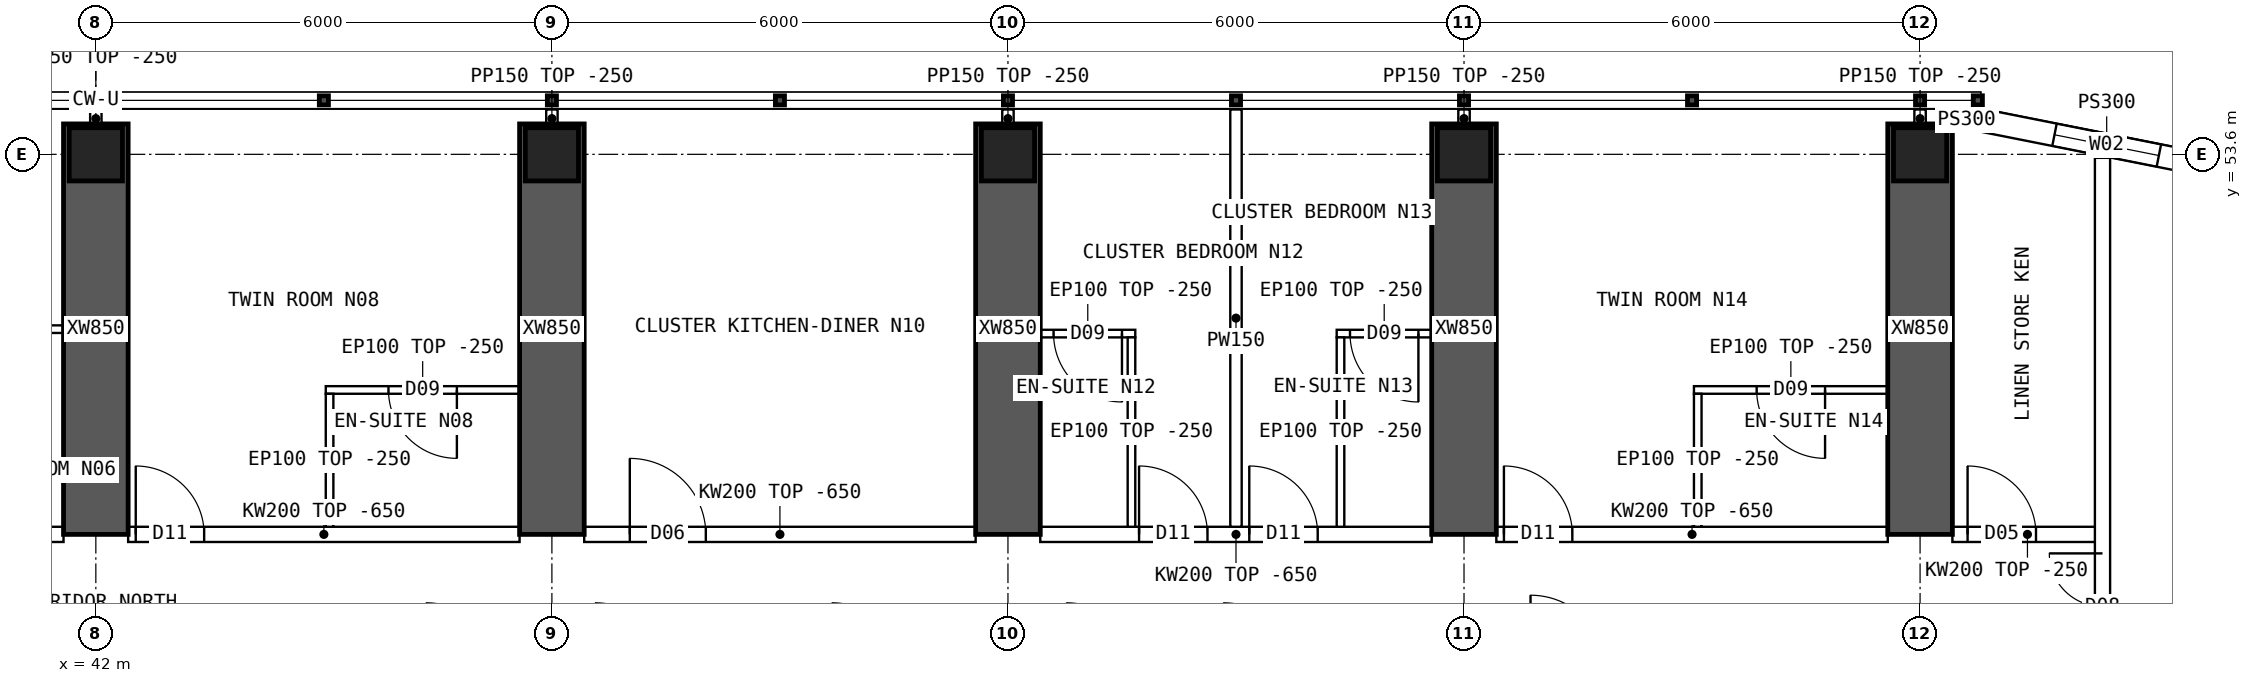
"""IFC4 building model, lengths in metres.
Left out: names, types, materials, properties, quantities, classifications, styles, units other than length and angle.
Written with IfcOpenShell. Run it as: python <this file> out.ifc"""

import sys

from ifc_helpers import new_model, si_unit, direction, frame, frame_2d, origin, origin_2d, place, context, subcontext, project, spatial, polyline, rectangle, hollow_rectangle, outline, extrude, element, fill, save


model = new_model("IFC4")
c1 = context("Model", 3, precision=1e-05, world=origin(), true_north=direction((0.0, 1.0)))
c2 = subcontext(c1, "Body", "Model", "MODEL_VIEW")
j1 = project(units=[si_unit("LENGTHUNIT", "METRE"), si_unit("PLANEANGLEUNIT", "RADIAN")], contexts=[c1])
p1 = place(None, origin())
s1 = spatial("IfcSite", under=j1, at=p1, CompositionType="ELEMENT")
p2 = place(p1, origin())
s2 = spatial("IfcBuilding", under=s1, at=p2, CompositionType="ELEMENT")
p3 = place(p2, frame((0.0, 0.0, 193.6)))
s3 = spatial("IfcBuildingStorey", under=s2, at=p3, CompositionType="ELEMENT", Elevation=193.6)
for number, where, z_axis, x_axis in (
    (1, (42.0, 53.6, 0.0), (0.0, 0.0, 1.0), (1.0, 0.0, 0.0)),
    (2, (48.0, 53.6, 0.0), (0.0, 0.0, 1.0), (1.0, 0.0, 0.0)),
    (3, (54.0, 53.6, 0.0), (0.0, 0.0, 1.0), (1.0, 0.0, 0.0)),
    (4, (60.0, 53.6, 0.0), (0.0, 0.0, 1.0), (1.0, 0.0, 0.0)),
    (5, (66.0, 53.6, 0.0), (0.0, 0.0, 1.0), (1.0, 0.0, 0.0)),
):
    element("IfcColumn", number, at=place(p3, frame(where, z_axis=z_axis, x_axis=x_axis)), inside=s3, PredefinedType="COLUMN", context=c2, shape_type="SweptSolid", body=[
        extrude(hollow_rectangle(XDim=0.7, YDim=0.7, WallThickness=0.07, at=origin_2d()), origin(), (0.0, 0.0, 1.0), 3.75),
    ])
for number, where, z_axis, x_axis in (
    (6, (42.0, 48.6, 0.0), (0.0, 0.0, 1.0), (0.0, 1.0, 0.0)),
    (7, (48.0, 48.6, 0.0), (0.0, 0.0, 1.0), (0.0, 1.0, 0.0)),
    (8, (54.0, 48.6, 0.0), (0.0, 0.0, 1.0), (0.0, 1.0, 0.0)),
    (9, (60.0, 48.6, 0.0), (0.0, 0.0, 1.0), (0.0, 1.0, 0.0)),
    (10, (66.0, 48.6, 0.0), (0.0, 0.0, 1.0), (0.0, 1.0, 0.0)),
):
    element("IfcWall", number, at=place(p3, frame(where, z_axis=z_axis, x_axis=x_axis)), inside=s3, PredefinedType="SHEAR", context=c2, shape_type="SweptSolid", body=[
        extrude(rectangle(XDim=5.4, YDim=0.85, at=frame_2d((2.7, 0.0))), origin(), (0.0, 0.0, 1.0), 3.75),
    ])
p4 = place(p3, frame((70.11, 53.392, 0.0), z_axis=(0.0, 0.0, 1.0), x_axis=(-0.98078325777, 0.195100490205, 0.0)))
e11 = element("IfcWall", 11, at=p4, inside=s3, PredefinedType="SOLIDWALL", context=c2, shape_type="SweptSolid", body=[
    extrude(outline(polyline([(-0.03, -0.15), (3.405, -0.15), (3.345, 0.15), (0.03, 0.15), (-0.03, -0.15)])), origin(), (0.0, 0.0, 1.0), 3.5),
])
p5 = place(p4, frame((0.988, 0.0, 0.9)))
e12 = element("IfcOpeningElement", 12, at=p5, cuts=e11, PredefinedType="OPENING", context=c2, shape_type="SweptSolid", body=[
    extrude(rectangle(XDim=1.4, YDim=1.8, at=frame_2d((0.7, 0.9))), frame((0.0, 0.16, 0.0), z_axis=(0.0, -1.0, 0.0), x_axis=(1.0, 0.0, 0.0)), (0.0, 0.0, 1.0), 0.32),
])
p6 = place(p3, frame((66.8, 54.05, 0.0), z_axis=(0.0, 0.0, 1.0), x_axis=(-1.0, 0.0, 0.0)))
e13 = element("IfcWall", 13, at=p6, inside=s3, PredefinedType="SOLIDWALL", context=c2, shape_type="SweptSolid", body=[
    extrude(rectangle(XDim=0.375, YDim=0.3, at=frame_2d((0.188, 0.0))), origin(), (0.0, 0.0, 1.0), 3.5),
])
p7 = place(p3, frame((36.425, 48.6, 0.0), z_axis=(0.0, 0.0, 1.0), x_axis=(1.0, 0.0, 0.0)))
e14 = element("IfcWall", 14, at=p7, inside=s3, PredefinedType="SOLIDWALL", context=c2, shape_type="SweptSolid", body=[
    extrude(outline(polyline([(0.0, 0.0), (5.15, 0.0), (5.15, 3.1), (0.0, 3.1), (0.0, 0.0)])), frame((0.0, 0.1, 0.0), z_axis=(0.0, -1.0, 0.0), x_axis=(1.0, 0.0, 0.0)), (0.0, 0.0, 1.0), 0.2),
])
p8 = place(p7, frame((0.3, 0.0, 0.0)))
e15 = element("IfcOpeningElement", 15, at=p8, cuts=e14, PredefinedType="OPENING", context=c2, shape_type="SweptSolid", body=[
    extrude(rectangle(XDim=1.0, YDim=2.1, at=frame_2d((0.5, 1.05))), frame((0.0, 0.11, 0.0), z_axis=(0.0, -1.0, 0.0), x_axis=(1.0, 0.0, 0.0)), (0.0, 0.0, 1.0), 0.22),
])
p9 = place(p3, frame((42.425, 48.6, 0.0), z_axis=(0.0, 0.0, 1.0), x_axis=(1.0, 0.0, 0.0)))
e16 = element("IfcWall", 16, at=p9, inside=s3, PredefinedType="SOLIDWALL", context=c2, shape_type="SweptSolid", body=[
    extrude(outline(polyline([(0.0, 0.0), (5.15, 0.0), (5.15, 3.1), (0.0, 3.1), (0.0, 0.0)])), frame((0.0, 0.1, 0.0), z_axis=(0.0, -1.0, 0.0), x_axis=(1.0, 0.0, 0.0)), (0.0, 0.0, 1.0), 0.2),
])
p10 = place(p9, frame((0.1, 0.0, 0.0)))
e17 = element("IfcOpeningElement", 17, at=p10, cuts=e16, PredefinedType="OPENING", context=c2, shape_type="SweptSolid", body=[
    extrude(rectangle(XDim=0.9, YDim=2.1, at=frame_2d((0.45, 1.05))), frame((0.0, 0.11, 0.0), z_axis=(0.0, -1.0, 0.0), x_axis=(1.0, 0.0, 0.0)), (0.0, 0.0, 1.0), 0.22),
])
p11 = place(p3, frame((48.425, 48.6, 0.0), z_axis=(0.0, 0.0, 1.0), x_axis=(1.0, 0.0, 0.0)))
e18 = element("IfcWall", 18, at=p11, inside=s3, PredefinedType="SOLIDWALL", context=c2, shape_type="SweptSolid", body=[
    extrude(outline(polyline([(0.0, 0.0), (5.15, 0.0), (5.15, 3.1), (0.0, 3.1), (0.0, 0.0)])), frame((0.0, 0.1, 0.0), z_axis=(0.0, -1.0, 0.0), x_axis=(1.0, 0.0, 0.0)), (0.0, 0.0, 1.0), 0.2),
])
p12 = place(p11, frame((0.6, 0.0, 0.0)))
e19 = element("IfcOpeningElement", 19, at=p12, cuts=e18, PredefinedType="OPENING", context=c2, shape_type="SweptSolid", body=[
    extrude(rectangle(XDim=1.0, YDim=2.1, at=frame_2d((0.5, 1.05))), frame((0.0, 0.11, 0.0), z_axis=(0.0, -1.0, 0.0), x_axis=(1.0, 0.0, 0.0)), (0.0, 0.0, 1.0), 0.22),
])
p13 = place(p3, frame((54.425, 48.6, 0.0), z_axis=(0.0, 0.0, 1.0), x_axis=(1.0, 0.0, 0.0)))
e20 = element("IfcWall", 20, at=p13, inside=s3, PredefinedType="SOLIDWALL", context=c2, shape_type="SweptSolid", body=[
    extrude(outline(polyline([(0.0, 0.0), (5.15, 0.0), (5.15, 3.1), (0.0, 3.1), (0.0, 0.0)])), frame((0.0, 0.1, 0.0), z_axis=(0.0, -1.0, 0.0), x_axis=(1.0, 0.0, 0.0)), (0.0, 0.0, 1.0), 0.2),
])
p14 = place(p13, frame((1.3, 0.0, 0.0)))
e21 = element("IfcOpeningElement", 21, at=p14, cuts=e20, PredefinedType="OPENING", context=c2, shape_type="SweptSolid", body=[
    extrude(rectangle(XDim=0.9, YDim=2.1, at=frame_2d((0.45, 1.05))), frame((0.0, 0.11, 0.0), z_axis=(0.0, -1.0, 0.0), x_axis=(1.0, 0.0, 0.0)), (0.0, 0.0, 1.0), 0.22),
])
p15 = place(p13, frame((2.75, 0.0, 0.0)))
e22 = element("IfcOpeningElement", 22, at=p15, cuts=e20, PredefinedType="OPENING", context=c2, shape_type="SweptSolid", body=[
    extrude(rectangle(XDim=0.9, YDim=2.1, at=frame_2d((0.45, 1.05))), frame((0.0, 0.11, 0.0), z_axis=(0.0, -1.0, 0.0), x_axis=(1.0, 0.0, 0.0)), (0.0, 0.0, 1.0), 0.22),
])
p16 = place(p3, frame((60.425, 48.6, 0.0), z_axis=(0.0, 0.0, 1.0), x_axis=(1.0, 0.0, 0.0)))
e23 = element("IfcWall", 23, at=p16, inside=s3, PredefinedType="SOLIDWALL", context=c2, shape_type="SweptSolid", body=[
    extrude(outline(polyline([(0.0, 0.0), (5.15, 0.0), (5.15, 3.1), (0.0, 3.1), (0.0, 0.0)])), frame((0.0, 0.1, 0.0), z_axis=(0.0, -1.0, 0.0), x_axis=(1.0, 0.0, 0.0)), (0.0, 0.0, 1.0), 0.2),
])
p17 = place(p16, frame((0.1, 0.0, 0.0)))
e24 = element("IfcOpeningElement", 24, at=p17, cuts=e23, PredefinedType="OPENING", context=c2, shape_type="SweptSolid", body=[
    extrude(rectangle(XDim=0.9, YDim=2.1, at=frame_2d((0.45, 1.05))), frame((0.0, 0.11, 0.0), z_axis=(0.0, -1.0, 0.0), x_axis=(1.0, 0.0, 0.0)), (0.0, 0.0, 1.0), 0.22),
])
p18 = place(p3, frame((66.425, 48.6, 0.0), z_axis=(0.0, 0.0, 1.0), x_axis=(1.0, 0.0, 0.0)))
e25 = element("IfcWall", 25, at=p18, inside=s3, PredefinedType="SOLIDWALL", context=c2, shape_type="SweptSolid", body=[
    extrude(rectangle(XDim=1.975, YDim=0.2, at=frame_2d((0.987, 0.0))), origin(), (0.0, 0.0, 1.0), 3.5),
])
p19 = place(p18, frame((0.2, 0.0, 0.0)))
e26 = element("IfcOpeningElement", 26, at=p19, cuts=e25, PredefinedType="OPENING", context=c2, shape_type="SweptSolid", body=[
    extrude(rectangle(XDim=0.9, YDim=2.1, at=frame_2d((0.45, 1.05))), frame((0.0, 0.11, 0.0), z_axis=(0.0, -1.0, 0.0), x_axis=(1.0, 0.0, 0.0)), (0.0, 0.0, 1.0), 0.22),
])
p20 = place(p3, frame((38.925, 51.3, 0.0), z_axis=(0.0, 0.0, 1.0), x_axis=(1.0, 0.0, 0.0)))
e27 = element("IfcWall", 27, at=p20, inside=s3, PredefinedType="PARTITIONING", context=c2, shape_type="SweptSolid", body=[
    extrude(rectangle(XDim=2.65, YDim=0.1, at=frame_2d((1.325, 0.0))), origin(), (0.0, 0.0, 1.0), 3.5),
])
p21 = place(p3, frame((45.025, 50.5, 0.0), z_axis=(0.0, 0.0, 1.0), x_axis=(1.0, 0.0, 0.0)))
e28 = element("IfcWall", 28, at=p21, inside=s3, PredefinedType="PARTITIONING", context=c2, shape_type="SweptSolid", body=[
    extrude(rectangle(XDim=2.55, YDim=0.1, at=frame_2d((1.275, 0.0))), origin(), (0.0, 0.0, 1.0), 3.5),
])
p22 = place(p21, frame((0.825, 0.0, 0.0)))
e29 = element("IfcOpeningElement", 29, at=p22, cuts=e28, PredefinedType="OPENING", context=c2, shape_type="SweptSolid", body=[
    extrude(rectangle(XDim=0.9, YDim=2.1, at=frame_2d((0.45, 1.05))), frame((0.0, 0.06, 0.0), z_axis=(0.0, -1.0, 0.0), x_axis=(1.0, 0.0, 0.0)), (0.0, 0.0, 1.0), 0.12),
])
p23 = place(p3, frame((45.075, 50.45, 0.0), z_axis=(0.0, 0.0, 1.0), x_axis=(0.0, -1.0, 0.0)))
e30 = element("IfcWall", 30, at=p23, inside=s3, PredefinedType="PARTITIONING", context=c2, shape_type="SweptSolid", body=[
    extrude(outline(polyline([(0.0, 0.0), (1.75, 0.0), (1.75, 3.1), (1.702, 3.1), (1.7, 3.5), (0.0, 3.5), (0.0, 0.0)])), frame((0.0, 0.05, 0.0), z_axis=(0.0, -1.0, 0.0), x_axis=(1.0, 0.0, 0.0)), (0.0, 0.0, 1.0), 0.1),
])
p24 = place(p3, frame((57.0, 54.19, 0.0), z_axis=(0.0, 0.0, 1.0), x_axis=(0.0, -1.0, 0.0)))
e31 = element("IfcWall", 31, at=p24, inside=s3, PredefinedType="PARTITIONING", context=c2, shape_type="SweptSolid", body=[
    extrude(outline(polyline([(0.0, 0.0), (5.49, 0.0), (5.49, 3.1), (5.442, 3.1), (5.44, 3.5), (0.792, 3.5), (0.79, 3.1), (0.392, 3.1), (0.39, 3.5), (0.0, 3.5), (0.0, 0.0)])), frame((0.0, 0.075, 0.0), z_axis=(0.0, -1.0, 0.0), x_axis=(1.0, 0.0, 0.0)), (0.0, 0.0, 1.0), 0.15),
])
p25 = place(p3, frame((54.425, 51.242, 0.0), z_axis=(0.0, 0.0, 1.0), x_axis=(1.0, 0.0, 0.0)))
e32 = element("IfcWall", 32, at=p25, inside=s3, PredefinedType="PARTITIONING", context=c2, shape_type="SweptSolid", body=[
    extrude(rectangle(XDim=1.25, YDim=0.1, at=frame_2d((0.625, 0.0))), origin(), (0.0, 0.0, 1.0), 3.5),
])
p26 = place(p25, frame((0.175, 0.0, 0.0)))
e33 = element("IfcOpeningElement", 33, at=p26, cuts=e32, PredefinedType="OPENING", context=c2, shape_type="SweptSolid", body=[
    extrude(rectangle(XDim=0.9, YDim=2.1, at=frame_2d((0.45, 1.05))), frame((0.0, 0.06, 0.0), z_axis=(0.0, -1.0, 0.0), x_axis=(1.0, 0.0, 0.0)), (0.0, 0.0, 1.0), 0.12),
])
p27 = place(p3, frame((55.625, 51.192, 0.0), z_axis=(0.0, 0.0, 1.0), x_axis=(0.0, -1.0, 0.0)))
e34 = element("IfcWall", 34, at=p27, inside=s3, PredefinedType="PARTITIONING", context=c2, shape_type="SweptSolid", body=[
    extrude(outline(polyline([(0.0, 0.0), (2.492, 0.0), (2.492, 3.1), (2.444, 3.1), (2.442, 3.5), (0.0, 3.5), (0.0, 0.0)])), frame((0.0, 0.05, 0.0), z_axis=(0.0, -1.0, 0.0), x_axis=(1.0, 0.0, 0.0)), (0.0, 0.0, 1.0), 0.1),
])
p28 = place(p3, frame((58.325, 51.242, 0.0), z_axis=(0.0, 0.0, 1.0), x_axis=(1.0, 0.0, 0.0)))
e35 = element("IfcWall", 35, at=p28, inside=s3, PredefinedType="PARTITIONING", context=c2, shape_type="SweptSolid", body=[
    extrude(rectangle(XDim=1.25, YDim=0.1, at=frame_2d((0.625, 0.0))), origin(), (0.0, 0.0, 1.0), 3.5),
])
p29 = place(p28, frame((0.175, 0.0, 0.0)))
e36 = element("IfcOpeningElement", 36, at=p29, cuts=e35, PredefinedType="OPENING", context=c2, shape_type="SweptSolid", body=[
    extrude(rectangle(XDim=0.9, YDim=2.1, at=frame_2d((0.45, 1.05))), frame((0.0, 0.06, 0.0), z_axis=(0.0, -1.0, 0.0), x_axis=(1.0, 0.0, 0.0)), (0.0, 0.0, 1.0), 0.12),
])
p30 = place(p3, frame((58.375, 51.192, 0.0), z_axis=(0.0, 0.0, 1.0), x_axis=(0.0, -1.0, 0.0)))
e37 = element("IfcWall", 37, at=p30, inside=s3, PredefinedType="PARTITIONING", context=c2, shape_type="SweptSolid", body=[
    extrude(outline(polyline([(0.0, 0.0), (2.492, 0.0), (2.492, 3.1), (2.444, 3.1), (2.442, 3.5), (0.0, 3.5), (0.0, 0.0)])), frame((0.0, 0.05, 0.0), z_axis=(0.0, -1.0, 0.0), x_axis=(1.0, 0.0, 0.0)), (0.0, 0.0, 1.0), 0.1),
])
p31 = place(p3, frame((63.025, 50.5, 0.0), z_axis=(0.0, 0.0, 1.0), x_axis=(1.0, 0.0, 0.0)))
e38 = element("IfcWall", 38, at=p31, inside=s3, PredefinedType="PARTITIONING", context=c2, shape_type="SweptSolid", body=[
    extrude(rectangle(XDim=2.55, YDim=0.1, at=frame_2d((1.275, 0.0))), origin(), (0.0, 0.0, 1.0), 3.5),
])
p32 = place(p31, frame((0.825, 0.0, 0.0)))
e39 = element("IfcOpeningElement", 39, at=p32, cuts=e38, PredefinedType="OPENING", context=c2, shape_type="SweptSolid", body=[
    extrude(rectangle(XDim=0.9, YDim=2.1, at=frame_2d((0.45, 1.05))), frame((0.0, 0.06, 0.0), z_axis=(0.0, -1.0, 0.0), x_axis=(1.0, 0.0, 0.0)), (0.0, 0.0, 1.0), 0.12),
])
p33 = place(p3, frame((63.075, 50.45, 0.0), z_axis=(0.0, 0.0, 1.0), x_axis=(0.0, -1.0, 0.0)))
e40 = element("IfcWall", 40, at=p33, inside=s3, PredefinedType="PARTITIONING", context=c2, shape_type="SweptSolid", body=[
    extrude(outline(polyline([(0.0, 0.0), (1.75, 0.0), (1.75, 3.1), (1.702, 3.1), (1.7, 3.5), (0.0, 3.5), (0.0, 0.0)])), frame((0.0, 0.05, 0.0), z_axis=(0.0, -1.0, 0.0), x_axis=(1.0, 0.0, 0.0)), (0.0, 0.0, 1.0), 0.1),
])
p34 = place(p3, frame((68.4, 10.446, 0.0), z_axis=(0.0, 0.0, 1.0), x_axis=(0.0, 1.0, 0.0)))
e41 = element("IfcWall", 41, at=p34, inside=s3, PredefinedType="SOLIDWALL", context=c2, shape_type="SweptSolid", body=[
    extrude(rectangle(XDim=43.107, YDim=0.2, at=frame_2d((21.554, 0.0))), origin(), (0.0, 0.0, 1.0), 3.5),
])
p35 = place(p34, frame((27.994, 0.0, 0.0)))
e42 = element("IfcOpeningElement", 42, at=p35, cuts=e41, PredefinedType="OPENING", context=c2, shape_type="SweptSolid", body=[
    extrude(rectangle(XDim=1.2, YDim=2.1, at=frame_2d((0.6, 1.05))), frame((0.0, 0.11, 0.0), z_axis=(0.0, -1.0, 0.0), x_axis=(1.0, 0.0, 0.0)), (0.0, 0.0, 1.0), 0.22),
])
p36 = place(p34, frame((5.104, 0.0, 0.0)))
e43 = element("IfcOpeningElement", 43, at=p36, cuts=e41, PredefinedType="OPENING", context=c2, shape_type="SweptSolid", body=[
    extrude(rectangle(XDim=1.4, YDim=2.1, at=frame_2d((0.7, 1.05))), frame((0.0, 0.11, 0.0), z_axis=(0.0, -1.0, 0.0), x_axis=(1.0, 0.0, 0.0)), (0.0, 0.0, 1.0), 0.22),
])
p37 = place(p34, frame((36.504, 0.0, 0.0)))
e44 = element("IfcOpeningElement", 44, at=p37, cuts=e41, PredefinedType="OPENING", context=c2, shape_type="SweptSolid", body=[
    extrude(rectangle(XDim=1.4, YDim=2.1, at=frame_2d((0.7, 1.05))), frame((0.0, 0.11, 0.0), z_axis=(0.0, -1.0, 0.0), x_axis=(1.0, 0.0, 0.0)), (0.0, 0.0, 1.0), 0.22),
])
for number, where, z_axis, x_axis in (
    (45, (42.0, 53.95, 0.0), (0.0, 0.0, 1.0), (0.0, 1.0, 0.0)),
    (46, (48.0, 53.95, 0.0), (0.0, 0.0, 1.0), (0.0, 1.0, 0.0)),
    (47, (54.0, 53.95, 0.0), (0.0, 0.0, 1.0), (0.0, 1.0, 0.0)),
    (48, (60.0, 53.95, 0.0), (0.0, 0.0, 1.0), (0.0, 1.0, 0.0)),
    (49, (66.0, 53.95, 0.0), (0.0, 0.0, 1.0), (0.0, 1.0, 0.0)),
):
    element("IfcWall", number, at=place(p3, frame(where, z_axis=z_axis, x_axis=x_axis)), inside=s3, PredefinedType="PARTITIONING", context=c2, shape_type="SweptSolid", body=[
        extrude(rectangle(XDim=0.24, YDim=0.15, at=frame_2d((0.12, 0.0))), origin(), (0.0, 0.0, 1.0), 3.5),
    ])
p38 = place(p5, origin())
e50 = element("IfcWindow", 50, at=p38, inside=s3, PartitioningType="SINGLE_PANEL", PredefinedType="WINDOW", context=c2, shape_type="SweptSolid", body=[
    extrude(rectangle(XDim=1.4, YDim=1.8, at=frame_2d((0.7, 0.9))), frame((0.0, 0.03, 0.0), z_axis=(0.0, -1.0, 0.0), x_axis=(1.0, 0.0, 0.0)), (0.0, 0.0, 1.0), 0.06),
])
fill(e12, e50)
p39 = place(p22, origin())
e51 = element("IfcDoor", 51, at=p39, inside=s3, OperationType="SINGLE_SWING_RIGHT", PredefinedType="DOOR", context=c2, shape_type="SweptSolid", body=[
    extrude(rectangle(XDim=0.9, YDim=2.1, at=frame_2d((0.45, 1.05))), frame((0.0, 0.025, 0.0), z_axis=(0.0, -1.0, 0.0), x_axis=(1.0, 0.0, 0.0)), (0.0, 0.0, 1.0), 0.05),
])
fill(e29, e51)
p40 = place(p10, origin())
e52 = element("IfcDoor", 52, at=p40, inside=s3, OperationType="SINGLE_SWING_LEFT", PredefinedType="DOOR", context=c2, shape_type="SweptSolid", body=[
    extrude(rectangle(XDim=0.9, YDim=2.1, at=frame_2d((0.45, 1.05))), frame((0.0, 0.025, 0.0), z_axis=(0.0, -1.0, 0.0), x_axis=(1.0, 0.0, 0.0)), (0.0, 0.0, 1.0), 0.05),
])
fill(e17, e52)
p41 = place(p12, origin())
e53 = element("IfcDoor", 53, at=p41, inside=s3, OperationType="SINGLE_SWING_LEFT", PredefinedType="DOOR", context=c2, shape_type="SweptSolid", body=[
    extrude(rectangle(XDim=1.0, YDim=2.1, at=frame_2d((0.5, 1.05))), frame((0.0, 0.025, 0.0), z_axis=(0.0, -1.0, 0.0), x_axis=(1.0, 0.0, 0.0)), (0.0, 0.0, 1.0), 0.05),
])
fill(e19, e53)
p42 = place(p26, origin())
e54 = element("IfcDoor", 54, at=p42, inside=s3, OperationType="SINGLE_SWING_RIGHT", PredefinedType="DOOR", context=c2, shape_type="SweptSolid", body=[
    extrude(rectangle(XDim=0.9, YDim=2.1, at=frame_2d((0.45, 1.05))), frame((0.0, 0.025, 0.0), z_axis=(0.0, -1.0, 0.0), x_axis=(1.0, 0.0, 0.0)), (0.0, 0.0, 1.0), 0.05),
])
fill(e33, e54)
p43 = place(p14, origin())
e55 = element("IfcDoor", 55, at=p43, inside=s3, OperationType="SINGLE_SWING_LEFT", PredefinedType="DOOR", context=c2, shape_type="SweptSolid", body=[
    extrude(rectangle(XDim=0.9, YDim=2.1, at=frame_2d((0.45, 1.05))), frame((0.0, 0.025, 0.0), z_axis=(0.0, -1.0, 0.0), x_axis=(1.0, 0.0, 0.0)), (0.0, 0.0, 1.0), 0.05),
])
fill(e21, e55)
p44 = place(p29, origin())
e56 = element("IfcDoor", 56, at=p44, inside=s3, OperationType="SINGLE_SWING_RIGHT", PredefinedType="DOOR", context=c2, shape_type="SweptSolid", body=[
    extrude(rectangle(XDim=0.9, YDim=2.1, at=frame_2d((0.45, 1.05))), frame((0.0, 0.025, 0.0), z_axis=(0.0, -1.0, 0.0), x_axis=(1.0, 0.0, 0.0)), (0.0, 0.0, 1.0), 0.05),
])
fill(e36, e56)
p45 = place(p15, origin())
e57 = element("IfcDoor", 57, at=p45, inside=s3, OperationType="SINGLE_SWING_LEFT", PredefinedType="DOOR", context=c2, shape_type="SweptSolid", body=[
    extrude(rectangle(XDim=0.9, YDim=2.1, at=frame_2d((0.45, 1.05))), frame((0.0, 0.025, 0.0), z_axis=(0.0, -1.0, 0.0), x_axis=(1.0, 0.0, 0.0)), (0.0, 0.0, 1.0), 0.05),
])
fill(e22, e57)
p46 = place(p32, origin())
e58 = element("IfcDoor", 58, at=p46, inside=s3, OperationType="SINGLE_SWING_RIGHT", PredefinedType="DOOR", context=c2, shape_type="SweptSolid", body=[
    extrude(rectangle(XDim=0.9, YDim=2.1, at=frame_2d((0.45, 1.05))), frame((0.0, 0.025, 0.0), z_axis=(0.0, -1.0, 0.0), x_axis=(1.0, 0.0, 0.0)), (0.0, 0.0, 1.0), 0.05),
])
fill(e39, e58)
p47 = place(p17, origin())
e59 = element("IfcDoor", 59, at=p47, inside=s3, OperationType="SINGLE_SWING_LEFT", PredefinedType="DOOR", context=c2, shape_type="SweptSolid", body=[
    extrude(rectangle(XDim=0.9, YDim=2.1, at=frame_2d((0.45, 1.05))), frame((0.0, 0.025, 0.0), z_axis=(0.0, -1.0, 0.0), x_axis=(1.0, 0.0, 0.0)), (0.0, 0.0, 1.0), 0.05),
])
fill(e24, e59)
p48 = place(p37, origin())
e60 = element("IfcDoor", 60, at=p48, inside=s3, OperationType="DOUBLE_DOOR_SINGLE_SWING", PredefinedType="DOOR", context=c2, shape_type="SweptSolid", body=[
    extrude(rectangle(XDim=1.4, YDim=2.1, at=frame_2d((0.7, 1.05))), frame((0.0, 0.025, 0.0), z_axis=(0.0, -1.0, 0.0), x_axis=(1.0, 0.0, 0.0)), (0.0, 0.0, 1.0), 0.05),
])
fill(e44, e60)
p49 = place(p19, origin())
e61 = element("IfcDoor", 61, at=p49, inside=s3, OperationType="SINGLE_SWING_LEFT", PredefinedType="DOOR", context=c2, shape_type="SweptSolid", body=[
    extrude(rectangle(XDim=0.9, YDim=2.1, at=frame_2d((0.45, 1.05))), frame((0.0, 0.025, 0.0), z_axis=(0.0, -1.0, 0.0), x_axis=(1.0, 0.0, 0.0)), (0.0, 0.0, 1.0), 0.05),
])
fill(e26, e61)
save(model, sys.argv[1])
